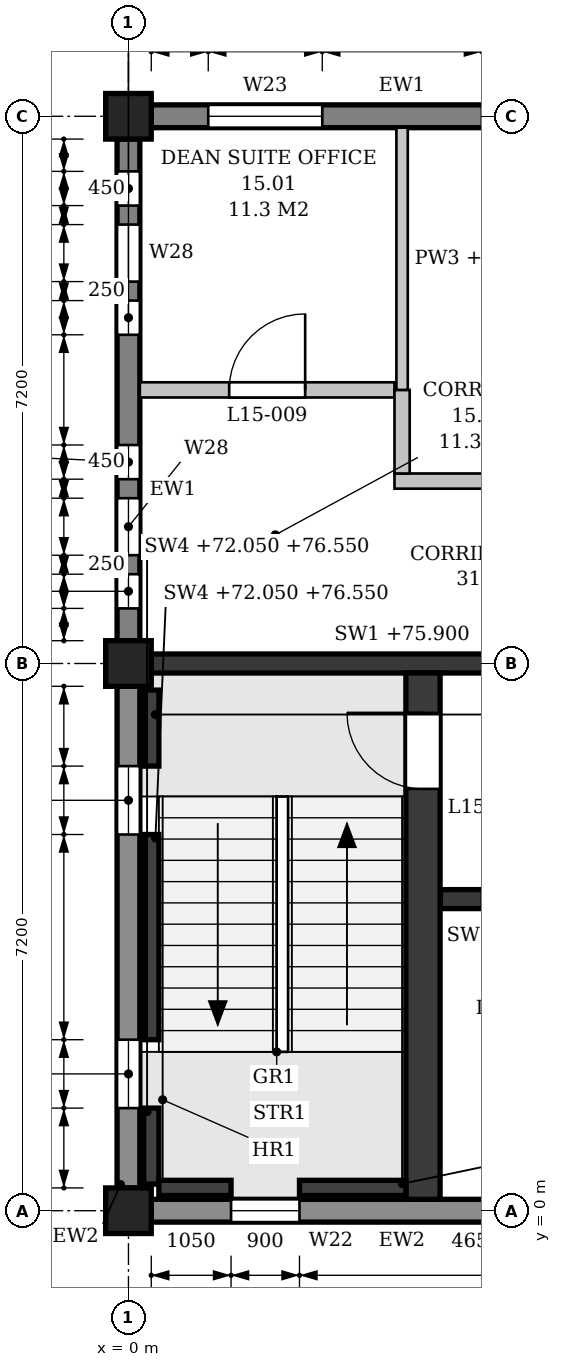
"""IFC4 building model, lengths in metres.
Left out: names, types, materials, properties, quantities, classifications, styles, units other than length and angle.
Written with IfcOpenShell. Run it as: python <this file> out.ifc"""

import sys

from ifc_helpers import new_model, si_unit, direction, frame, frame_2d, origin, origin_2d, place, context, subcontext, project, spatial, polyline, rectangle, outline, extrude, element, fill, save


model = new_model("IFC4")
c1 = context("Model", 3, precision=1e-05, world=origin(), true_north=direction((0.0, 1.0)))
c2 = subcontext(c1, "Body", "Model", "MODEL_VIEW")
j1 = project(units=[si_unit("LENGTHUNIT", "METRE"), si_unit("PLANEANGLEUNIT", "RADIAN")], contexts=[c1])
p1 = place(None, origin())
s1 = spatial("IfcSite", under=j1, at=p1, CompositionType="ELEMENT")
p2 = place(p1, origin())
s2 = spatial("IfcBuilding", under=s1, at=p2, CompositionType="ELEMENT")
p3 = place(p2, frame((0.0, 0.0, 72.3)))
s3 = spatial("IfcBuildingStorey", under=s2, at=p3, CompositionType="ELEMENT", Elevation=72.3)
for number, where, z_axis, x_axis in (
    (1, (0.0, 0.0, 0.0), (0.0, 0.0, 1.0), (1.0, 0.0, 0.0)),
    (2, (0.0, 7.2, 0.0), (0.0, 0.0, 1.0), (1.0, 0.0, 0.0)),
    (3, (0.0, 14.4, 0.0), (0.0, 0.0, 1.0), (1.0, 0.0, 0.0)),
):
    element("IfcColumn", number, at=place(p3, frame(where, z_axis=z_axis, x_axis=x_axis)), inside=s3, PredefinedType="COLUMN", context=c2, shape_type="SweptSolid", body=[
        extrude(rectangle(XDim=0.6, YDim=0.6, at=origin_2d()), origin(), (0.0, 0.0, 1.0), 4.5),
    ])
p4 = place(p3, frame((0.0, 0.3, 0.0), z_axis=(0.0, 0.0, 1.0), x_axis=(0.0, 1.0, 0.0)))
e4 = element("IfcWall", 4, at=p4, inside=s3, PredefinedType="STANDARD", context=c2, shape_type="SweptSolid", body=[
    extrude(rectangle(XDim=6.6, YDim=0.3, at=frame_2d((3.3, 0.0))), origin(), (0.0, 0.0, 1.0), 3.65),
])
p5 = place(p4, frame((1.05, 0.0, 0.9)))
e5 = element("IfcOpeningElement", 5, at=p5, cuts=e4, PredefinedType="OPENING", context=c2, shape_type="SweptSolid", body=[
    extrude(outline(polyline([(0.0, 0.0), (0.9, 0.0), (0.9, 2.25), (0.45, 2.7), (0.0, 2.25), (0.0, 0.0)])), frame((0.0, 0.16, 0.0), z_axis=(0.0, -1.0, 0.0), x_axis=(1.0, 0.0, 0.0)), (0.0, 0.0, 1.0), 0.32),
])
p6 = place(p4, frame((4.65, 0.0, 0.9)))
e6 = element("IfcOpeningElement", 6, at=p6, cuts=e4, PredefinedType="OPENING", context=c2, shape_type="SweptSolid", body=[
    extrude(outline(polyline([(0.0, 0.0), (0.9, 0.0), (0.9, 2.25), (0.45, 2.7), (0.0, 2.25), (0.0, 0.0)])), frame((0.0, 0.16, 0.0), z_axis=(0.0, -1.0, 0.0), x_axis=(1.0, 0.0, 0.0)), (0.0, 0.0, 1.0), 0.32),
])
p7 = place(p3, frame((0.0, 7.5, 0.0), z_axis=(0.0, 0.0, 1.0), x_axis=(0.0, 1.0, 0.0)))
e7 = element("IfcWall", 7, at=p7, inside=s3, PredefinedType="STANDARD", context=c2, shape_type="SweptSolid", body=[
    extrude(rectangle(XDim=6.6, YDim=0.3, at=frame_2d((3.3, 0.0))), origin(), (0.0, 0.0, 1.0), 3.65),
])
p8 = place(p7, frame((0.425, 0.0, 1.5)))
e8 = element("IfcOpeningElement", 8, at=p8, cuts=e7, PredefinedType="OPENING", context=c2, shape_type="SweptSolid", body=[
    extrude(outline(polyline([(0.0, 0.0), (0.45, 0.0), (0.45, 1.85), (0.225, 2.1), (0.0, 1.85), (0.0, 0.0)])), frame((0.0, 0.16, 0.0), z_axis=(0.0, -1.0, 0.0), x_axis=(1.0, 0.0, 0.0)), (0.0, 0.0, 1.0), 0.32),
])
p9 = place(p7, frame((1.125, 0.0, 0.9)))
e9 = element("IfcOpeningElement", 9, at=p9, cuts=e7, PredefinedType="OPENING", context=c2, shape_type="SweptSolid", body=[
    extrude(outline(polyline([(0.0, 0.0), (0.75, 0.0), (0.75, 2.25), (0.375, 2.7), (0.0, 2.25), (0.0, 0.0)])), frame((0.0, 0.16, 0.0), z_axis=(0.0, -1.0, 0.0), x_axis=(1.0, 0.0, 0.0)), (0.0, 0.0, 1.0), 0.32),
])
p10 = place(p7, frame((2.125, 0.0, 1.5)))
e10 = element("IfcOpeningElement", 10, at=p10, cuts=e7, PredefinedType="OPENING", context=c2, shape_type="SweptSolid", body=[
    extrude(outline(polyline([(0.0, 0.0), (0.45, 0.0), (0.45, 1.85), (0.225, 2.1), (0.0, 1.85), (0.0, 0.0)])), frame((0.0, 0.16, 0.0), z_axis=(0.0, -1.0, 0.0), x_axis=(1.0, 0.0, 0.0)), (0.0, 0.0, 1.0), 0.32),
])
p11 = place(p7, frame((4.025, 0.0, 1.5)))
e11 = element("IfcOpeningElement", 11, at=p11, cuts=e7, PredefinedType="OPENING", context=c2, shape_type="SweptSolid", body=[
    extrude(outline(polyline([(0.0, 0.0), (0.45, 0.0), (0.45, 1.85), (0.225, 2.1), (0.0, 1.85), (0.0, 0.0)])), frame((0.0, 0.16, 0.0), z_axis=(0.0, -1.0, 0.0), x_axis=(1.0, 0.0, 0.0)), (0.0, 0.0, 1.0), 0.32),
])
p12 = place(p7, frame((4.725, 0.0, 0.9)))
e12 = element("IfcOpeningElement", 12, at=p12, cuts=e7, PredefinedType="OPENING", context=c2, shape_type="SweptSolid", body=[
    extrude(outline(polyline([(0.0, 0.0), (0.75, 0.0), (0.75, 2.25), (0.375, 2.7), (0.0, 2.25), (0.0, 0.0)])), frame((0.0, 0.16, 0.0), z_axis=(0.0, -1.0, 0.0), x_axis=(1.0, 0.0, 0.0)), (0.0, 0.0, 1.0), 0.32),
])
p13 = place(p7, frame((5.725, 0.0, 1.5)))
e13 = element("IfcOpeningElement", 13, at=p13, cuts=e7, PredefinedType="OPENING", context=c2, shape_type="SweptSolid", body=[
    extrude(outline(polyline([(0.0, 0.0), (0.45, 0.0), (0.45, 1.85), (0.225, 2.1), (0.0, 1.85), (0.0, 0.0)])), frame((0.0, 0.16, 0.0), z_axis=(0.0, -1.0, 0.0), x_axis=(1.0, 0.0, 0.0)), (0.0, 0.0, 1.0), 0.32),
])
p14 = place(p3, frame((0.3, 0.0, 0.0), z_axis=(0.0, 0.0, 1.0), x_axis=(1.0, 0.0, 0.0)))
e14 = element("IfcWall", 14, at=p14, inside=s3, PredefinedType="STANDARD", context=c2, shape_type="SweptSolid", body=[
    extrude(rectangle(XDim=6.6, YDim=0.3, at=frame_2d((3.3, 0.0))), origin(), (0.0, 0.0, 1.0), 3.65),
])
p15 = place(p14, frame((1.05, 0.0, 0.9)))
e15 = element("IfcOpeningElement", 15, at=p15, cuts=e14, PredefinedType="OPENING", context=c2, shape_type="SweptSolid", body=[
    extrude(outline(polyline([(0.0, 0.0), (0.9, 0.0), (0.9, 2.25), (0.45, 2.7), (0.0, 2.25), (0.0, 0.0)])), frame((0.0, 0.16, 0.0), z_axis=(0.0, -1.0, 0.0), x_axis=(1.0, 0.0, 0.0)), (0.0, 0.0, 1.0), 0.32),
])
p16 = place(p3, frame((6.9, 14.4, 0.0), z_axis=(0.0, 0.0, 1.0), x_axis=(-1.0, 0.0, 0.0)))
e16 = element("IfcWall", 16, at=p16, inside=s3, PredefinedType="STANDARD", context=c2, shape_type="SweptSolid", body=[
    extrude(rectangle(XDim=6.6, YDim=0.3, at=frame_2d((3.3, 0.0))), origin(), (0.0, 0.0, 1.0), 3.65),
])
p17 = place(p16, frame((0.75, 0.0, 0.9)))
e17 = element("IfcOpeningElement", 17, at=p17, cuts=e16, PredefinedType="OPENING", context=c2, shape_type="SweptSolid", body=[
    extrude(outline(polyline([(0.0, 0.0), (1.5, 0.0), (1.5, 1.95), (0.75, 2.7), (0.0, 1.95), (0.0, 0.0)])), frame((0.0, 0.16, 0.0), z_axis=(0.0, -1.0, 0.0), x_axis=(1.0, 0.0, 0.0)), (0.0, 0.0, 1.0), 0.32),
])
p18 = place(p16, frame((4.35, 0.0, 0.9)))
e18 = element("IfcOpeningElement", 18, at=p18, cuts=e16, PredefinedType="OPENING", context=c2, shape_type="SweptSolid", body=[
    extrude(outline(polyline([(0.0, 0.0), (1.5, 0.0), (1.5, 1.95), (0.75, 2.7), (0.0, 1.95), (0.0, 0.0)])), frame((0.0, 0.16, 0.0), z_axis=(0.0, -1.0, 0.0), x_axis=(1.0, 0.0, 0.0)), (0.0, 0.0, 1.0), 0.32),
])
p19 = place(p3, frame((0.3, 7.2, 0.0), z_axis=(0.0, 0.0, 1.0), x_axis=(1.0, 0.0, 0.0)))
e19 = element("IfcWall", 19, at=p19, inside=s3, PredefinedType="SHEAR", context=c2, shape_type="SweptSolid", body=[
    extrude(rectangle(XDim=6.6, YDim=0.25, at=frame_2d((3.3, 0.0))), origin(), (0.0, 0.0, 1.0), 3.6),
])
p20 = place(p19, frame((4.95, 0.0, 0.0)))
e20 = element("IfcOpeningElement", 20, at=p20, cuts=e19, PredefinedType="OPENING", context=c2, shape_type="SweptSolid", body=[
    extrude(rectangle(XDim=1.1, YDim=2.1, at=frame_2d((0.55, 1.05))), frame((0.0, 0.135, 0.0), z_axis=(0.0, -1.0, 0.0), x_axis=(1.0, 0.0, 0.0)), (0.0, 0.0, 1.0), 0.27),
])
p21 = place(p3, frame((0.3, 0.35, -0.25), z_axis=(0.0, 0.0, 1.0), x_axis=(0.0, 1.0, 0.0)))
e21 = element("IfcWall", 21, at=p21, inside=s3, PredefinedType="SHEAR", context=c2, shape_type="SweptSolid", body=[
    extrude(rectangle(XDim=1.0, YDim=0.2, at=frame_2d((0.5, 0.0))), origin(), (0.0, 0.0, 1.0), 4.5),
])
p22 = place(p3, frame((0.3, 2.25, -0.25), z_axis=(0.0, 0.0, 1.0), x_axis=(0.0, 1.0, 0.0)))
e22 = element("IfcWall", 22, at=p22, inside=s3, PredefinedType="SHEAR", context=c2, shape_type="SweptSolid", body=[
    extrude(rectangle(XDim=2.7, YDim=0.2, at=frame_2d((1.35, 0.0))), origin(), (0.0, 0.0, 1.0), 4.5),
])
p23 = place(p3, frame((0.3, 5.85, -0.25), z_axis=(0.0, 0.0, 1.0), x_axis=(0.0, 1.0, 0.0)))
e23 = element("IfcWall", 23, at=p23, inside=s3, PredefinedType="SHEAR", context=c2, shape_type="SweptSolid", body=[
    extrude(rectangle(XDim=1.0, YDim=0.2, at=frame_2d((0.5, 0.0))), origin(), (0.0, 0.0, 1.0), 4.5),
])
p24 = place(p3, frame((0.4, 0.3, -0.25), z_axis=(0.0, 0.0, 1.0), x_axis=(1.0, 0.0, 0.0)))
e24 = element("IfcWall", 24, at=p24, inside=s3, PredefinedType="SHEAR", context=c2, shape_type="SweptSolid", body=[
    extrude(rectangle(XDim=0.95, YDim=0.2, at=frame_2d((0.475, 0.0))), origin(), (0.0, 0.0, 1.0), 4.5),
])
p25 = place(p3, frame((2.25, 0.3, -0.25), z_axis=(0.0, 0.0, 1.0), x_axis=(1.0, 0.0, 0.0)))
e25 = element("IfcWall", 25, at=p25, inside=s3, PredefinedType="SHEAR", context=c2, shape_type="SweptSolid", body=[
    extrude(rectangle(XDim=1.4, YDim=0.2, at=frame_2d((0.7, 0.0))), origin(), (0.0, 0.0, 1.0), 4.5),
])
p26 = place(p3, frame((3.875, 0.15, 0.0), z_axis=(0.0, 0.0, 1.0), x_axis=(0.0, 1.0, 0.0)))
e26 = element("IfcWall", 26, at=p26, inside=s3, PredefinedType="SHEAR", context=c2, shape_type="SweptSolid", body=[
    extrude(rectangle(XDim=6.925, YDim=0.45, at=frame_2d((3.462, 0.0))), origin(), (0.0, 0.0, 1.0), 4.25),
])
p27 = place(p26, frame((5.4, 0.0, 0.0)))
e27 = element("IfcOpeningElement", 27, at=p27, cuts=e26, PredefinedType="OPENING", context=c2, shape_type="SweptSolid", body=[
    extrude(rectangle(XDim=1.0, YDim=2.1, at=frame_2d((0.5, 1.05))), frame((0.0, 0.235, 0.0), z_axis=(0.0, -1.0, 0.0), x_axis=(1.0, 0.0, 0.0)), (0.0, 0.0, 1.0), 0.47),
])
p28 = place(p3, frame((4.1, 4.1, 0.0), z_axis=(0.0, 0.0, 1.0), x_axis=(1.0, 0.0, 0.0)))
e28 = element("IfcWall", 28, at=p28, inside=s3, PredefinedType="SHEAR", context=c2, shape_type="SweptSolid", body=[
    extrude(rectangle(XDim=2.975, YDim=0.25, at=frame_2d((1.487, 0.0))), origin(), (0.0, 0.0, 1.0), 4.25),
])
p29 = place(p28, frame((0.55, 0.0, 0.0)))
e29 = element("IfcOpeningElement", 29, at=p29, cuts=e28, PredefinedType="OPENING", context=c2, shape_type="SweptSolid", body=[
    extrude(rectangle(XDim=0.9, YDim=2.1, at=frame_2d((0.45, 1.05))), frame((0.0, 0.135, 0.0), z_axis=(0.0, -1.0, 0.0), x_axis=(1.0, 0.0, 0.0)), (0.0, 0.0, 1.0), 0.27),
])
p30 = place(p3, frame((3.5, 9.6, 0.0), z_axis=(0.0, 0.0, 1.0), x_axis=(1.0, 0.0, 0.0)))
e30 = element("IfcWall", 30, at=p30, inside=s3, PredefinedType="PARTITIONING", context=c2, shape_type="SweptSolid", body=[
    extrude(outline(polyline([(0.0, 0.0), (18.0, 0.0), (18.0, 3.6), (17.9, 3.6), (17.9, 4.25), (11.1, 4.25), (11.1, 3.6), (10.7, 3.6), (10.7, 4.25), (3.9, 4.25), (3.9, 3.6), (3.5, 3.6), (3.5, 4.25), (0.0, 4.25), (0.0, 0.0)])), frame((0.0, 0.1, 0.0), z_axis=(0.0, -1.0, 0.0), x_axis=(1.0, 0.0, 0.0)), (0.0, 0.0, 1.0), 0.2),
])
p31 = place(p30, frame((15.75, 0.0, 0.0)))
e31 = element("IfcOpeningElement", 31, at=p31, cuts=e30, PredefinedType="OPENING", context=c2, shape_type="SweptSolid", body=[
    extrude(rectangle(XDim=1.0, YDim=2.1, at=frame_2d((0.5, 1.05))), frame((0.0, 0.11, 0.0), z_axis=(0.0, -1.0, 0.0), x_axis=(1.0, 0.0, 0.0)), (0.0, 0.0, 1.0), 0.22),
])
p32 = place(p30, frame((4.5, 0.0, 0.0)))
e32 = element("IfcOpeningElement", 32, at=p32, cuts=e30, PredefinedType="OPENING", context=c2, shape_type="SweptSolid", body=[
    extrude(rectangle(XDim=2.0, YDim=2.1, at=frame_2d((1.0, 1.05))), frame((0.0, 0.11, 0.0), z_axis=(0.0, -1.0, 0.0), x_axis=(1.0, 0.0, 0.0)), (0.0, 0.0, 1.0), 0.22),
])
p33 = place(p30, frame((11.7, 0.0, 0.0)))
e33 = element("IfcOpeningElement", 33, at=p33, cuts=e30, PredefinedType="OPENING", context=c2, shape_type="SweptSolid", body=[
    extrude(rectangle(XDim=2.0, YDim=2.1, at=frame_2d((1.0, 1.05))), frame((0.0, 0.11, 0.0), z_axis=(0.0, -1.0, 0.0), x_axis=(1.0, 0.0, 0.0)), (0.0, 0.0, 1.0), 0.22),
])
p34 = place(p3, frame((0.15, 10.8, 0.0), z_axis=(0.0, 0.0, 1.0), x_axis=(1.0, 0.0, 0.0)))
e34 = element("IfcWall", 34, at=p34, inside=s3, PredefinedType="PARTITIONING", context=c2, shape_type="SweptSolid", body=[
    extrude(outline(polyline([(0.0, 0.0), (3.35, 0.0), (3.35, 4.25), (0.05, 4.25), (0.05, 3.65), (0.0, 3.65), (0.0, 0.0)])), frame((0.0, 0.1, 0.0), z_axis=(0.0, -1.0, 0.0), x_axis=(1.0, 0.0, 0.0)), (0.0, 0.0, 1.0), 0.2),
])
p35 = place(p34, frame((1.175, 0.0, 0.0)))
e35 = element("IfcOpeningElement", 35, at=p35, cuts=e34, PredefinedType="OPENING", context=c2, shape_type="SweptSolid", body=[
    extrude(rectangle(XDim=1.0, YDim=2.1, at=frame_2d((0.5, 1.05))), frame((0.0, 0.11, 0.0), z_axis=(0.0, -1.0, 0.0), x_axis=(1.0, 0.0, 0.0)), (0.0, 0.0, 1.0), 0.22),
])
p36 = place(p3, frame((3.6, 9.7, 0.0), z_axis=(0.0, 0.0, 1.0), x_axis=(0.0, 1.0, 0.0)))
e36 = element("IfcWall", 36, at=p36, inside=s3, PredefinedType="PARTITIONING", context=c2, shape_type="SweptSolid", body=[
    extrude(rectangle(XDim=1.1, YDim=0.2, at=frame_2d((0.55, 0.0))), origin(), (0.0, 0.0, 1.0), 4.25),
])
p37 = place(p3, frame((3.6, 10.8, 0.0), z_axis=(0.0, 0.0, 1.0), x_axis=(0.0, 1.0, 0.0)))
e37 = element("IfcWall", 37, at=p37, inside=s3, PredefinedType="PARTITIONING", context=c2, shape_type="SweptSolid", body=[
    extrude(rectangle(XDim=3.45, YDim=0.15, at=frame_2d((1.725, 0.0))), origin(), (0.0, 0.0, 1.0), 3.6),
])
p38 = place(p18, origin())
e38 = element("IfcWindow", 38, at=p38, inside=s3, PartitioningType="SINGLE_PANEL", PredefinedType="WINDOW", context=c2, shape_type="SweptSolid", body=[
    extrude(outline(polyline([(0.0, 0.0), (1.5, 0.0), (1.5, 1.95), (0.75, 2.7), (0.0, 1.95), (0.0, 0.0)])), frame((0.0, 0.03, 0.0), z_axis=(0.0, -1.0, 0.0), x_axis=(1.0, 0.0, 0.0)), (0.0, 0.0, 1.0), 0.06),
])
fill(e18, e38)
p39 = place(p15, origin())
e39 = element("IfcWindow", 39, at=p39, inside=s3, PartitioningType="SINGLE_PANEL", PredefinedType="WINDOW", context=c2, shape_type="SweptSolid", body=[
    extrude(outline(polyline([(0.0, 0.0), (0.9, 0.0), (0.9, 2.25), (0.45, 2.7), (0.0, 2.25), (0.0, 0.0)])), frame((0.0, 0.03, 0.0), z_axis=(0.0, -1.0, 0.0), x_axis=(1.0, 0.0, 0.0)), (0.0, 0.0, 1.0), 0.06),
])
fill(e15, e39)
p40 = place(p5, origin())
e40 = element("IfcWindow", 40, at=p40, inside=s3, PartitioningType="SINGLE_PANEL", PredefinedType="WINDOW", context=c2, shape_type="SweptSolid", body=[
    extrude(outline(polyline([(0.0, 0.0), (0.9, 0.0), (0.9, 2.25), (0.45, 2.7), (0.0, 2.25), (0.0, 0.0)])), frame((0.0, 0.03, 0.0), z_axis=(0.0, -1.0, 0.0), x_axis=(1.0, 0.0, 0.0)), (0.0, 0.0, 1.0), 0.06),
])
fill(e5, e40)
p41 = place(p6, origin())
e41 = element("IfcWindow", 41, at=p41, inside=s3, PartitioningType="SINGLE_PANEL", PredefinedType="WINDOW", context=c2, shape_type="SweptSolid", body=[
    extrude(outline(polyline([(0.0, 0.0), (0.9, 0.0), (0.9, 2.25), (0.45, 2.7), (0.0, 2.25), (0.0, 0.0)])), frame((0.0, 0.03, 0.0), z_axis=(0.0, -1.0, 0.0), x_axis=(1.0, 0.0, 0.0)), (0.0, 0.0, 1.0), 0.06),
])
fill(e6, e41)
p42 = place(p8, origin())
e42 = element("IfcWindow", 42, at=p42, inside=s3, PartitioningType="SINGLE_PANEL", PredefinedType="WINDOW", context=c2, shape_type="SweptSolid", body=[
    extrude(outline(polyline([(0.0, 0.0), (0.45, 0.0), (0.45, 1.85), (0.225, 2.1), (0.0, 1.85), (0.0, 0.0)])), frame((0.0, 0.03, 0.0), z_axis=(0.0, -1.0, 0.0), x_axis=(1.0, 0.0, 0.0)), (0.0, 0.0, 1.0), 0.06),
])
fill(e8, e42)
p43 = place(p9, origin())
e43 = element("IfcWindow", 43, at=p43, inside=s3, PartitioningType="SINGLE_PANEL", PredefinedType="WINDOW", context=c2, shape_type="SweptSolid", body=[
    extrude(outline(polyline([(0.0, 0.0), (0.75, 0.0), (0.75, 2.25), (0.375, 2.7), (0.0, 2.25), (0.0, 0.0)])), frame((0.0, 0.03, 0.0), z_axis=(0.0, -1.0, 0.0), x_axis=(1.0, 0.0, 0.0)), (0.0, 0.0, 1.0), 0.06),
])
fill(e9, e43)
p44 = place(p10, origin())
e44 = element("IfcWindow", 44, at=p44, inside=s3, PartitioningType="SINGLE_PANEL", PredefinedType="WINDOW", context=c2, shape_type="SweptSolid", body=[
    extrude(outline(polyline([(0.0, 0.0), (0.45, 0.0), (0.45, 1.85), (0.225, 2.1), (0.0, 1.85), (0.0, 0.0)])), frame((0.0, 0.03, 0.0), z_axis=(0.0, -1.0, 0.0), x_axis=(1.0, 0.0, 0.0)), (0.0, 0.0, 1.0), 0.06),
])
fill(e10, e44)
p45 = place(p11, origin())
e45 = element("IfcWindow", 45, at=p45, inside=s3, PartitioningType="SINGLE_PANEL", PredefinedType="WINDOW", context=c2, shape_type="SweptSolid", body=[
    extrude(outline(polyline([(0.0, 0.0), (0.45, 0.0), (0.45, 1.85), (0.225, 2.1), (0.0, 1.85), (0.0, 0.0)])), frame((0.0, 0.03, 0.0), z_axis=(0.0, -1.0, 0.0), x_axis=(1.0, 0.0, 0.0)), (0.0, 0.0, 1.0), 0.06),
])
fill(e11, e45)
p46 = place(p12, origin())
e46 = element("IfcWindow", 46, at=p46, inside=s3, PartitioningType="SINGLE_PANEL", PredefinedType="WINDOW", context=c2, shape_type="SweptSolid", body=[
    extrude(outline(polyline([(0.0, 0.0), (0.75, 0.0), (0.75, 2.25), (0.375, 2.7), (0.0, 2.25), (0.0, 0.0)])), frame((0.0, 0.03, 0.0), z_axis=(0.0, -1.0, 0.0), x_axis=(1.0, 0.0, 0.0)), (0.0, 0.0, 1.0), 0.06),
])
fill(e12, e46)
p47 = place(p13, origin())
e47 = element("IfcWindow", 47, at=p47, inside=s3, PartitioningType="SINGLE_PANEL", PredefinedType="WINDOW", context=c2, shape_type="SweptSolid", body=[
    extrude(outline(polyline([(0.0, 0.0), (0.45, 0.0), (0.45, 1.85), (0.225, 2.1), (0.0, 1.85), (0.0, 0.0)])), frame((0.0, 0.03, 0.0), z_axis=(0.0, -1.0, 0.0), x_axis=(1.0, 0.0, 0.0)), (0.0, 0.0, 1.0), 0.06),
])
fill(e13, e47)
p48 = place(p27, origin())
e48 = element("IfcDoor", 48, at=p48, inside=s3, OperationType="SINGLE_SWING_RIGHT", PredefinedType="DOOR", context=c2, shape_type="SweptSolid", body=[
    extrude(rectangle(XDim=1.0, YDim=2.1, at=frame_2d((0.5, 1.05))), frame((0.0, 0.025, 0.0), z_axis=(0.0, -1.0, 0.0), x_axis=(1.0, 0.0, 0.0)), (0.0, 0.0, 1.0), 0.05),
])
fill(e27, e48)
p49 = place(p35, origin())
e49 = element("IfcDoor", 49, at=p49, inside=s3, OperationType="SINGLE_SWING_RIGHT", PredefinedType="DOOR", context=c2, shape_type="SweptSolid", body=[
    extrude(rectangle(XDim=1.0, YDim=2.1, at=frame_2d((0.5, 1.05))), frame((0.0, 0.025, 0.0), z_axis=(0.0, -1.0, 0.0), x_axis=(1.0, 0.0, 0.0)), (0.0, 0.0, 1.0), 0.05),
])
fill(e35, e49)
save(model, sys.argv[1])
